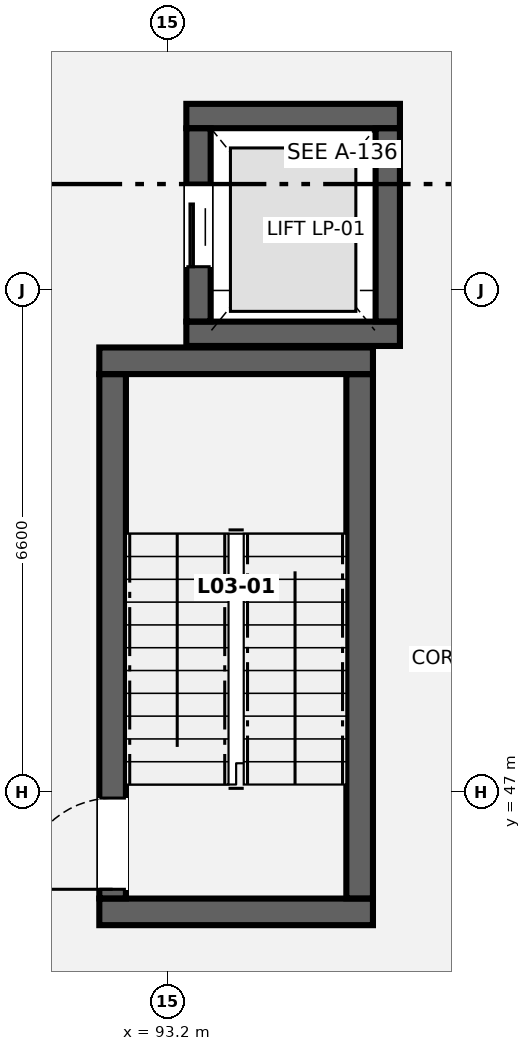
"""IFC4 building model, lengths in metres.
Left out: names, types, materials, properties, quantities, classifications, styles, units other than length and angle.
Written with IfcOpenShell. Run it as: python <this file> out.ifc"""

import sys

from ifc_helpers import new_model, si_unit, direction, frame, frame_2d, origin, place, context, subcontext, project, spatial, rectangle, extrude, element, fill, save


model = new_model("IFC4")
c1 = context("Model", 3, precision=1e-05, world=origin(), true_north=direction((0.0, 1.0)))
c2 = subcontext(c1, "Body", "Model", "MODEL_VIEW")
j1 = project(units=[si_unit("LENGTHUNIT", "METRE"), si_unit("PLANEANGLEUNIT", "RADIAN")], contexts=[c1])
p1 = place(None, origin())
s1 = spatial("IfcSite", under=j1, at=p1, CompositionType="ELEMENT")
p2 = place(p1, origin())
s2 = spatial("IfcBuilding", under=s1, at=p2, CompositionType="ELEMENT")
p3 = place(p2, frame((0.0, 0.0, 13.3)))
s3 = spatial("IfcBuildingStorey", under=s2, at=p3, CompositionType="ELEMENT", Elevation=13.3)
for number, where, z_axis, x_axis in (
    (1, (92.3, 45.425, 0.0), (0.0, 0.0, 1.0), (1.0, 0.0, 0.0)),
    (2, (92.3, 52.675, 0.0), (0.0, 0.0, 1.0), (1.0, 0.0, 0.0)),
):
    element("IfcWall", number, at=place(p3, frame(where, z_axis=z_axis, x_axis=x_axis)), inside=s3, PredefinedType="SHEAR", context=c2, shape_type="SweptSolid", body=[
        extrude(rectangle(XDim=3.6, YDim=0.35, at=frame_2d((1.8, 0.0))), origin(), (0.0, 0.0, 1.0), 3.98),
    ])
p4 = place(p3, frame((92.475, 45.602, 0.0), z_axis=(0.0, 0.0, 1.0), x_axis=(0.0, 1.0, 0.0)))
e3 = element("IfcWall", 3, at=p4, inside=s3, PredefinedType="SHEAR", context=c2, shape_type="SweptSolid", body=[
    extrude(rectangle(XDim=6.896, YDim=0.35, at=frame_2d((3.448, 0.0))), origin(), (0.0, 0.0, 1.0), 3.98),
])
p5 = place(p4, frame((0.12, 0.0, 0.0)))
e4 = element("IfcOpeningElement", 4, at=p5, cuts=e3, PredefinedType="OPENING", context=c2, shape_type="SweptSolid", body=[
    extrude(rectangle(XDim=1.2, YDim=2.15, at=frame_2d((0.6, 1.075))), frame((0.0, 0.185, 0.0), z_axis=(0.0, -1.0, 0.0), x_axis=(1.0, 0.0, 0.0)), (0.0, 0.0, 1.0), 0.37),
])
p6 = place(p3, frame((95.725, 45.602, 0.0), z_axis=(0.0, 0.0, 1.0), x_axis=(0.0, 1.0, 0.0)))
e5 = element("IfcWall", 5, at=p6, inside=s3, PredefinedType="SHEAR", context=c2, shape_type="SweptSolid", body=[
    extrude(rectangle(XDim=6.896, YDim=0.35, at=frame_2d((3.448, 0.0))), origin(), (0.0, 0.0, 1.0), 3.98),
])
for number, where, z_axis, x_axis in (
    (6, (93.445, 53.03, 0.0), (0.0, 0.0, 1.0), (1.0, 0.0, 0.0)),
    (7, (93.445, 55.895, 0.0), (0.0, 0.0, 1.0), (1.0, 0.0, 0.0)),
):
    element("IfcWall", number, at=place(p3, frame(where, z_axis=z_axis, x_axis=x_axis)), inside=s3, PredefinedType="SHEAR", context=c2, shape_type="SweptSolid", body=[
        extrude(rectangle(XDim=2.81, YDim=0.32, at=frame_2d((1.405, 0.0))), origin(), (0.0, 0.0, 1.0), 3.98),
    ])
p7 = place(p3, frame((93.605, 53.192, 0.0), z_axis=(0.0, 0.0, 1.0), x_axis=(0.0, 1.0, 0.0)))
e8 = element("IfcWall", 8, at=p7, inside=s3, PredefinedType="SHEAR", context=c2, shape_type="SweptSolid", body=[
    extrude(rectangle(XDim=2.541, YDim=0.32, at=frame_2d((1.271, 0.0))), origin(), (0.0, 0.0, 1.0), 3.98),
])
p8 = place(p7, frame((0.72, 0.0, 0.0)))
e9 = element("IfcOpeningElement", 9, at=p8, cuts=e8, PredefinedType="OPENING", context=c2, shape_type="SweptSolid", body=[
    extrude(rectangle(XDim=1.1, YDim=2.15, at=frame_2d((0.55, 1.075))), frame((0.0, 0.17, 0.0), z_axis=(0.0, -1.0, 0.0), x_axis=(1.0, 0.0, 0.0)), (0.0, 0.0, 1.0), 0.34),
])
p9 = place(p3, frame((96.095, 53.192, 0.0), z_axis=(0.0, 0.0, 1.0), x_axis=(0.0, 1.0, 0.0)))
e10 = element("IfcWall", 10, at=p9, inside=s3, PredefinedType="SHEAR", context=c2, shape_type="SweptSolid", body=[
    extrude(rectangle(XDim=2.541, YDim=0.32, at=frame_2d((1.271, 0.0))), origin(), (0.0, 0.0, 1.0), 3.98),
])
p10 = place(p5, origin())
e11 = element("IfcDoor", 11, at=p10, inside=s3, OperationType="SINGLE_SWING_LEFT", PredefinedType="DOOR", context=c2, shape_type="SweptSolid", body=[
    extrude(rectangle(XDim=1.2, YDim=2.15, at=frame_2d((0.6, 1.075))), frame((0.0, 0.025, 0.0), z_axis=(0.0, -1.0, 0.0), x_axis=(1.0, 0.0, 0.0)), (0.0, 0.0, 1.0), 0.05),
])
fill(e4, e11)
p11 = place(p8, origin())
e12 = element("IfcDoor", 12, at=p11, inside=s3, OperationType="SLIDING_TO_LEFT", PredefinedType="DOOR", context=c2, shape_type="SweptSolid", body=[
    extrude(rectangle(XDim=1.1, YDim=2.15, at=frame_2d((0.55, 1.075))), frame((0.0, 0.025, 0.0), z_axis=(0.0, -1.0, 0.0), x_axis=(1.0, 0.0, 0.0)), (0.0, 0.0, 1.0), 0.05),
])
fill(e9, e12)
save(model, sys.argv[1])
